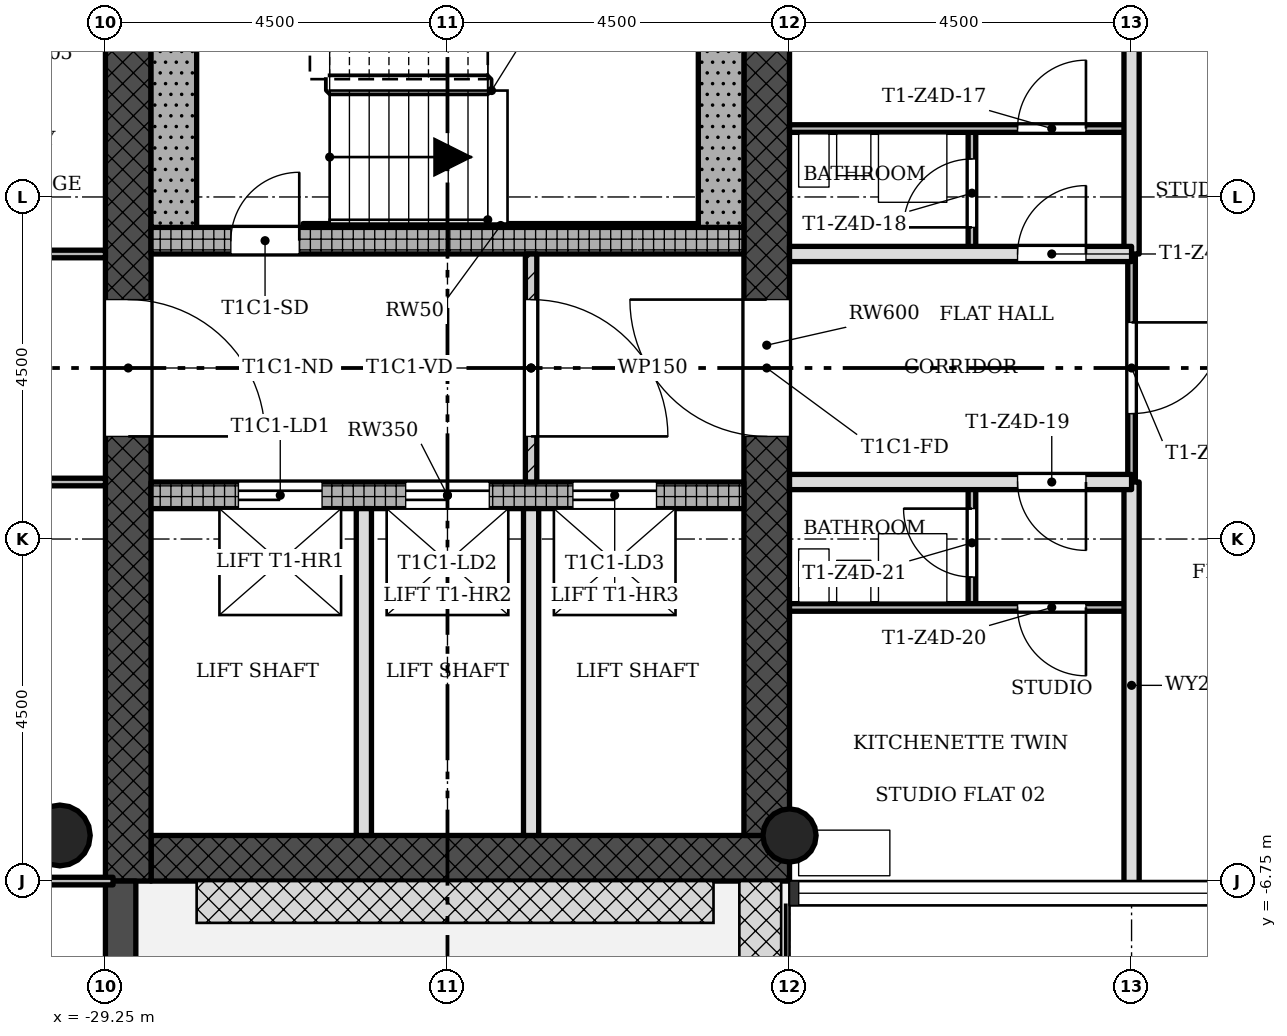
"""IFC4 building model, lengths in metres.
Left out: names, types, materials, properties, quantities, classifications, styles, units other than length and angle.
Written with IfcOpenShell. Run it as: python <this file> out.ifc"""

import sys

from ifc_helpers import new_model, si_unit, direction, frame, frame_2d, origin, origin_2d, place, context, subcontext, project, spatial, rectangle, hollow_circle, extrude, element, fill, save


model = new_model("IFC4")
c1 = context("Model", 3, precision=1e-05, world=origin(), true_north=direction((0.0, 1.0)))
c2 = subcontext(c1, "Body", "Model", "MODEL_VIEW")
j1 = project(units=[si_unit("LENGTHUNIT", "METRE"), si_unit("PLANEANGLEUNIT", "RADIAN")], contexts=[c1])
p1 = place(None, origin())
s1 = spatial("IfcSite", under=j1, at=p1, CompositionType="ELEMENT")
p2 = place(p1, origin())
s2 = spatial("IfcBuilding", under=s1, at=p2, CompositionType="ELEMENT")
p3 = place(p2, frame((0.0, 0.0, 199.4)))
s3 = spatial("IfcBuildingStorey", under=s2, at=p3, CompositionType="ELEMENT", Elevation=199.4)
p4 = place(p3, frame((-28.65, -6.45, 0.0), z_axis=(0.0, 0.0, 1.0), x_axis=(1.0, 0.0, 0.0)))
e1 = element("IfcWall", 1, at=p4, inside=s3, PredefinedType="SHEAR", context=c2, shape_type="SweptSolid", body=[
    extrude(rectangle(XDim=8.4, YDim=0.6, at=frame_2d((4.2, 0.0))), origin(), (0.0, 0.0, 1.0), 3.4),
])
p5 = place(p3, frame((-20.55, -6.15, 0.0), z_axis=(0.0, 0.0, 1.0), x_axis=(0.0, 1.0, 0.0)))
e2 = element("IfcWall", 2, at=p5, inside=s3, PredefinedType="SHEAR", context=c2, shape_type="SweptSolid", body=[
    extrude(rectangle(XDim=12.9, YDim=0.6, at=frame_2d((6.45, 0.0))), origin(), (0.0, 0.0, 1.0), 3.4),
])
p6 = place(p5, frame((5.25, 0.0, 0.0)))
e3 = element("IfcOpeningElement", 3, at=p6, cuts=e2, PredefinedType="OPENING", context=c2, shape_type="SweptSolid", body=[
    extrude(rectangle(XDim=1.8, YDim=2.1, at=frame_2d((0.9, 1.05))), frame((0.0, 0.31, 0.0), z_axis=(0.0, -1.0, 0.0), x_axis=(1.0, 0.0, 0.0)), (0.0, 0.0, 1.0), 0.62),
])
p7 = place(p3, frame((-28.95, 6.15, 0.0), z_axis=(0.0, 0.0, 1.0), x_axis=(0.0, -1.0, 0.0)))
e4 = element("IfcWall", 4, at=p7, inside=s3, PredefinedType="SHEAR", context=c2, shape_type="SweptSolid", body=[
    extrude(rectangle(XDim=12.9, YDim=0.6, at=frame_2d((6.45, 0.0))), origin(), (0.0, 0.0, 1.0), 3.4),
])
p8 = place(p7, frame((5.25, 0.0, 0.0)))
e5 = element("IfcOpeningElement", 5, at=p8, cuts=e4, PredefinedType="OPENING", context=c2, shape_type="SweptSolid", body=[
    extrude(rectangle(XDim=1.8, YDim=2.1, at=frame_2d((0.9, 1.05))), frame((0.0, 0.31, 0.0), z_axis=(0.0, -1.0, 0.0), x_axis=(1.0, 0.0, 0.0)), (0.0, 0.0, 1.0), 0.62),
])
p9 = place(p3, frame((-28.65, -1.675, 0.0), z_axis=(0.0, 0.0, 1.0), x_axis=(1.0, 0.0, 0.0)))
e6 = element("IfcWall", 6, at=p9, inside=s3, PredefinedType="SHEAR", context=c2, shape_type="SweptSolid", body=[
    extrude(rectangle(XDim=7.8, YDim=0.35, at=frame_2d((3.9, 0.0))), origin(), (0.0, 0.0, 1.0), 3.4),
])
p10 = place(p9, frame((1.15, 0.0, 0.0)))
e7 = element("IfcOpeningElement", 7, at=p10, cuts=e6, PredefinedType="OPENING", context=c2, shape_type="SweptSolid", body=[
    extrude(rectangle(XDim=1.1, YDim=2.1, at=frame_2d((0.55, 1.05))), frame((0.0, 0.185, 0.0), z_axis=(0.0, -1.0, 0.0), x_axis=(1.0, 0.0, 0.0)), (0.0, 0.0, 1.0), 0.37),
])
p11 = place(p9, frame((3.35, 0.0, 0.0)))
e8 = element("IfcOpeningElement", 8, at=p11, cuts=e6, PredefinedType="OPENING", context=c2, shape_type="SweptSolid", body=[
    extrude(rectangle(XDim=1.1, YDim=2.1, at=frame_2d((0.55, 1.05))), frame((0.0, 0.185, 0.0), z_axis=(0.0, -1.0, 0.0), x_axis=(1.0, 0.0, 0.0)), (0.0, 0.0, 1.0), 0.37),
])
p12 = place(p9, frame((5.55, 0.0, 0.0)))
e9 = element("IfcOpeningElement", 9, at=p12, cuts=e6, PredefinedType="OPENING", context=c2, shape_type="SweptSolid", body=[
    extrude(rectangle(XDim=1.1, YDim=2.1, at=frame_2d((0.55, 1.05))), frame((0.0, 0.185, 0.0), z_axis=(0.0, -1.0, 0.0), x_axis=(1.0, 0.0, 0.0)), (0.0, 0.0, 1.0), 0.37),
])
p13 = place(p3, frame((-28.65, 1.675, 0.0), z_axis=(0.0, 0.0, 1.0), x_axis=(1.0, 0.0, 0.0)))
e10 = element("IfcWall", 10, at=p13, inside=s3, PredefinedType="SHEAR", context=c2, shape_type="SweptSolid", body=[
    extrude(rectangle(XDim=7.8, YDim=0.35, at=frame_2d((3.9, 0.0))), origin(), (0.0, 0.0, 1.0), 3.4),
])
p14 = place(p13, frame((1.05, 0.0, 0.0)))
e11 = element("IfcOpeningElement", 11, at=p14, cuts=e10, PredefinedType="OPENING", context=c2, shape_type="SweptSolid", body=[
    extrude(rectangle(XDim=0.9, YDim=2.1, at=frame_2d((0.45, 1.05))), frame((0.0, 0.185, 0.0), z_axis=(0.0, -1.0, 0.0), x_axis=(1.0, 0.0, 0.0)), (0.0, 0.0, 1.0), 0.37),
])
p15 = place(p3, frame((-20.25, -6.15, 0.0), z_axis=(0.0, 0.0, 1.0), x_axis=(1.0, 0.0, 0.0)))
e12 = element("IfcColumn", 12, at=p15, inside=s3, PredefinedType="COLUMN", context=c2, shape_type="SweptSolid", body=[
    extrude(hollow_circle(Radius=0.35, WallThickness=0.025, at=origin_2d()), origin(), (0.0, 0.0, 1.0), 3.4),
])
p16 = place(p3, frame((-29.85, -6.15, 0.0), z_axis=(0.0, 0.0, 1.0), x_axis=(1.0, 0.0, 0.0)))
e13 = element("IfcColumn", 13, at=p16, inside=s3, PredefinedType="COLUMN", context=c2, shape_type="SweptSolid", body=[
    extrude(hollow_circle(Radius=0.4, WallThickness=0.028, at=origin_2d()), origin(), (0.0, 0.0, 1.0), 3.4),
])
p17 = place(p3, frame((-29.05, -11.25, -0.02), z_axis=(0.0, 0.0, 1.0), x_axis=(0.0, 1.0, 0.0)))
e14 = element("IfcWall", 14, at=p17, inside=s3, PredefinedType="STANDARD", context=c2, shape_type="SweptSolid", body=[
    extrude(rectangle(XDim=4.5, YDim=0.4, at=frame_2d((2.25, 0.0))), origin(), (0.0, 0.0, 1.0), 3.12),
])
p18 = place(p17, frame((1.35, 0.0, 0.02)))
e15 = element("IfcOpeningElement", 15, at=p18, cuts=e14, PredefinedType="OPENING", context=c2, shape_type="SweptSolid", body=[
    extrude(rectangle(XDim=1.8, YDim=2.1, at=frame_2d((0.9, 1.05))), frame((0.0, 0.21, 0.0), z_axis=(0.0, -1.0, 0.0), x_axis=(1.0, 0.0, 0.0)), (0.0, 0.0, 1.0), 0.42),
])
p19 = place(p3, frame((-23.65, -1.5, 0.0), z_axis=(0.0, 0.0, 1.0), x_axis=(0.0, 1.0, 0.0)))
e16 = element("IfcWall", 16, at=p19, inside=s3, PredefinedType="PARTITIONING", context=c2, shape_type="SweptSolid", body=[
    extrude(rectangle(XDim=3.0, YDim=0.15, at=frame_2d((1.5, 0.0))), origin(), (0.0, 0.0, 1.0), 3.0),
])
p20 = place(p19, frame((0.6, 0.0, 0.0)))
e17 = element("IfcOpeningElement", 17, at=p20, cuts=e16, PredefinedType="OPENING", context=c2, shape_type="SweptSolid", body=[
    extrude(rectangle(XDim=1.8, YDim=2.1, at=frame_2d((0.9, 1.05))), frame((0.0, 0.085, 0.0), z_axis=(0.0, -1.0, 0.0), x_axis=(1.0, 0.0, 0.0)), (0.0, 0.0, 1.0), 0.17),
])
for number, where, z_axis, x_axis in (
    (18, (-25.85, -6.15, 0.0), (0.0, 0.0, 1.0), (0.0, 1.0, 0.0)),
    (19, (-23.65, -6.15, 0.0), (0.0, 0.0, 1.0), (0.0, 1.0, 0.0)),
):
    element("IfcWall", number, at=place(p3, frame(where, z_axis=z_axis, x_axis=x_axis)), inside=s3, PredefinedType="SOLIDWALL", context=c2, shape_type="SweptSolid", body=[
        extrude(rectangle(XDim=4.3, YDim=0.2, at=frame_2d((2.15, 0.0))), origin(), (0.0, 0.0, 1.0), 3.0),
    ])
p21 = place(p3, frame((-17.85, -3.15, 0.0), z_axis=(0.0, 0.0, 1.0), x_axis=(0.0, 1.0, 0.0)))
e20 = element("IfcWall", 20, at=p21, inside=s3, PredefinedType="PARTITIONING", context=c2, shape_type="SweptSolid", body=[
    extrude(rectangle(XDim=1.65, YDim=0.1, at=frame_2d((0.825, 0.0))), origin(), (0.0, 0.0, 1.0), 3.0),
])
p22 = place(p21, frame((0.4, 0.0, 0.0)))
e21 = element("IfcOpeningElement", 21, at=p22, cuts=e20, PredefinedType="OPENING", context=c2, shape_type="SweptSolid", body=[
    extrude(rectangle(XDim=0.9, YDim=2.1, at=frame_2d((0.45, 1.05))), frame((0.0, 0.06, 0.0), z_axis=(0.0, -1.0, 0.0), x_axis=(1.0, 0.0, 0.0)), (0.0, 0.0, 1.0), 0.12),
])
p23 = place(p3, frame((-17.85, 1.5, 0.0), z_axis=(0.0, 0.0, 1.0), x_axis=(0.0, 1.0, 0.0)))
e22 = element("IfcWall", 22, at=p23, inside=s3, PredefinedType="PARTITIONING", context=c2, shape_type="SweptSolid", body=[
    extrude(rectangle(XDim=1.65, YDim=0.1, at=frame_2d((0.825, 0.0))), origin(), (0.0, 0.0, 1.0), 3.0),
])
p24 = place(p23, frame((0.35, 0.0, 0.0)))
e23 = element("IfcOpeningElement", 23, at=p24, cuts=e22, PredefinedType="OPENING", context=c2, shape_type="SweptSolid", body=[
    extrude(rectangle(XDim=0.9, YDim=2.1, at=frame_2d((0.45, 1.05))), frame((0.0, 0.06, 0.0), z_axis=(0.0, -1.0, 0.0), x_axis=(1.0, 0.0, 0.0)), (0.0, 0.0, 1.0), 0.12),
])
p25 = place(p3, frame((-15.75, -1.5, 0.0), z_axis=(0.0, 0.0, 1.0), x_axis=(0.0, 1.0, 0.0)))
e24 = element("IfcWall", 24, at=p25, inside=s3, PredefinedType="PARTITIONING", context=c2, shape_type="SweptSolid", body=[
    extrude(rectangle(XDim=3.0, YDim=0.1, at=frame_2d((1.5, 0.0))), origin(), (0.0, 0.0, 1.0), 3.0),
])
p26 = place(p25, frame((0.9, 0.0, 0.0)))
e25 = element("IfcOpeningElement", 25, at=p26, cuts=e24, PredefinedType="OPENING", context=c2, shape_type="SweptSolid", body=[
    extrude(rectangle(XDim=1.2, YDim=2.1, at=frame_2d((0.6, 1.05))), frame((0.0, 0.06, 0.0), z_axis=(0.0, -1.0, 0.0), x_axis=(1.0, 0.0, 0.0)), (0.0, 0.0, 1.0), 0.12),
])
for number, where, z_axis, x_axis in (
    (26, (-15.75, -6.85, 0.0), (0.0, 0.0, 1.0), (0.0, 1.0, 0.0)),
    (27, (-15.75, 1.5, 0.0), (0.0, 0.0, 1.0), (0.0, 1.0, 0.0)),
):
    element("IfcWall", number, at=place(p3, frame(where, z_axis=z_axis, x_axis=x_axis)), inside=s3, PredefinedType="SOLIDWALL", context=c2, shape_type="SweptSolid", body=[
        extrude(rectangle(XDim=5.35, YDim=0.2, at=frame_2d((2.675, 0.0))), origin(), (0.0, 0.0, 1.0), 3.0),
    ])
p27 = place(p3, frame((-35.1, -6.75, 0.0), z_axis=(0.0, 0.0, 1.0), x_axis=(1.0, 0.0, 0.0)))
e28 = element("IfcWall", 28, at=p27, inside=s3, PredefinedType="PARTITIONING", context=c2, shape_type="SweptSolid", body=[
    extrude(rectangle(XDim=5.95, YDim=0.1, at=frame_2d((2.975, 0.0))), origin(), (0.0, 0.0, 1.0), 3.0),
])
p28 = place(p3, frame((-20.25, -3.15, 0.0), z_axis=(0.0, 0.0, 1.0), x_axis=(1.0, 0.0, 0.0)))
e29 = element("IfcWall", 29, at=p28, inside=s3, PredefinedType="PARTITIONING", context=c2, shape_type="SweptSolid", body=[
    extrude(rectangle(XDim=4.5, YDim=0.1, at=frame_2d((2.25, 0.0))), origin(), (0.0, 0.0, 1.0), 3.0),
])
p29 = place(p28, frame((3.0, 0.0, 0.0)))
e30 = element("IfcOpeningElement", 30, at=p29, cuts=e29, PredefinedType="OPENING", context=c2, shape_type="SweptSolid", body=[
    extrude(rectangle(XDim=0.9, YDim=2.1, at=frame_2d((0.45, 1.05))), frame((0.0, 0.06, 0.0), z_axis=(0.0, -1.0, 0.0), x_axis=(1.0, 0.0, 0.0)), (0.0, 0.0, 1.0), 0.12),
])
p30 = place(p3, frame((-31.5, -1.5, 0.0), z_axis=(0.0, 0.0, 1.0), x_axis=(1.0, 0.0, 0.0)))
e31 = element("IfcWall", 31, at=p30, inside=s3, PredefinedType="PARTITIONING", context=c2, shape_type="SweptSolid", body=[
    extrude(rectangle(XDim=2.25, YDim=0.1, at=frame_2d((1.125, 0.0))), origin(), (0.0, 0.0, 1.0), 3.0),
])
p31 = place(p3, frame((-20.25, -1.5, 0.0), z_axis=(0.0, 0.0, 1.0), x_axis=(1.0, 0.0, 0.0)))
e32 = element("IfcWall", 32, at=p31, inside=s3, PredefinedType="SOLIDWALL", context=c2, shape_type="SweptSolid", body=[
    extrude(rectangle(XDim=4.5, YDim=0.2, at=frame_2d((2.25, 0.0))), origin(), (0.0, 0.0, 1.0), 3.0),
])
p32 = place(p31, frame((3.0, 0.0, 0.0)))
e33 = element("IfcOpeningElement", 33, at=p32, cuts=e32, PredefinedType="OPENING", context=c2, shape_type="SweptSolid", body=[
    extrude(rectangle(XDim=0.9, YDim=2.1, at=frame_2d((0.45, 1.05))), frame((0.0, 0.11, 0.0), z_axis=(0.0, -1.0, 0.0), x_axis=(1.0, 0.0, 0.0)), (0.0, 0.0, 1.0), 0.22),
])
p33 = place(p3, frame((-31.5, 1.5, 0.0), z_axis=(0.0, 0.0, 1.0), x_axis=(1.0, 0.0, 0.0)))
e34 = element("IfcWall", 34, at=p33, inside=s3, PredefinedType="PARTITIONING", context=c2, shape_type="SweptSolid", body=[
    extrude(rectangle(XDim=2.25, YDim=0.1, at=frame_2d((1.125, 0.0))), origin(), (0.0, 0.0, 1.0), 3.0),
])
p34 = place(p3, frame((-20.25, 1.5, 0.0), z_axis=(0.0, 0.0, 1.0), x_axis=(1.0, 0.0, 0.0)))
e35 = element("IfcWall", 35, at=p34, inside=s3, PredefinedType="SOLIDWALL", context=c2, shape_type="SweptSolid", body=[
    extrude(rectangle(XDim=4.5, YDim=0.2, at=frame_2d((2.25, 0.0))), origin(), (0.0, 0.0, 1.0), 3.0),
])
p35 = place(p34, frame((3.0, 0.0, 0.0)))
e36 = element("IfcOpeningElement", 36, at=p35, cuts=e35, PredefinedType="OPENING", context=c2, shape_type="SweptSolid", body=[
    extrude(rectangle(XDim=0.9, YDim=2.1, at=frame_2d((0.45, 1.05))), frame((0.0, 0.11, 0.0), z_axis=(0.0, -1.0, 0.0), x_axis=(1.0, 0.0, 0.0)), (0.0, 0.0, 1.0), 0.22),
])
p36 = place(p3, frame((-20.25, 3.15, 0.0), z_axis=(0.0, 0.0, 1.0), x_axis=(1.0, 0.0, 0.0)))
e37 = element("IfcWall", 37, at=p36, inside=s3, PredefinedType="PARTITIONING", context=c2, shape_type="SweptSolid", body=[
    extrude(rectangle(XDim=4.5, YDim=0.1, at=frame_2d((2.25, 0.0))), origin(), (0.0, 0.0, 1.0), 3.0),
])
p37 = place(p36, frame((3.0, 0.0, 0.0)))
e38 = element("IfcOpeningElement", 38, at=p37, cuts=e37, PredefinedType="OPENING", context=c2, shape_type="SweptSolid", body=[
    extrude(rectangle(XDim=0.9, YDim=2.1, at=frame_2d((0.45, 1.05))), frame((0.0, 0.06, 0.0), z_axis=(0.0, -1.0, 0.0), x_axis=(1.0, 0.0, 0.0)), (0.0, 0.0, 1.0), 0.12),
])
for number, where, z_axis, x_axis in (
    (39, (-21.15, 1.85, 0.0), (0.0, 0.0, 1.0), (0.0, 1.0, 0.0)),
    (40, (-28.35, 1.85, 0.0), (0.0, 0.0, 1.0), (0.0, 1.0, 0.0)),
):
    element("IfcWall", number, at=place(p3, frame(where, z_axis=z_axis, x_axis=x_axis)), inside=s3, PredefinedType="SHEAR", context=c2, shape_type="SweptSolid", body=[
        extrude(rectangle(XDim=4.3, YDim=0.6, at=frame_2d((2.15, 0.0))), origin(), (0.0, 0.0, 1.0), 3.4),
    ])
p38 = place(p3, frame((-26.65, 1.875, 0.0), z_axis=(0.0, 0.0, 1.0), x_axis=(1.0, 0.0, 0.0)))
e41 = element("IfcWall", 41, at=p38, inside=s3, PredefinedType="SHEAR", context=c2, shape_type="SweptSolid", body=[
    extrude(rectangle(XDim=5.2, YDim=0.05, at=frame_2d((2.6, 0.0))), origin(), (0.0, 0.0, 1.0), 3.4),
])
p39 = place(p20, origin())
e42 = element("IfcDoor", 42, at=p39, inside=s3, OperationType="SINGLE_SWING_LEFT", PredefinedType="DOOR", context=c2, shape_type="SweptSolid", body=[
    extrude(rectangle(XDim=1.8, YDim=2.1, at=frame_2d((0.9, 1.05))), frame((0.0, 0.025, 0.0), z_axis=(0.0, -1.0, 0.0), x_axis=(1.0, 0.0, 0.0)), (0.0, 0.0, 1.0), 0.05),
])
fill(e17, e42)
p40 = place(p35, origin())
e43 = element("IfcDoor", 43, at=p40, inside=s3, OperationType="SINGLE_SWING_LEFT", PredefinedType="DOOR", context=c2, shape_type="SweptSolid", body=[
    extrude(rectangle(XDim=0.9, YDim=2.1, at=frame_2d((0.45, 1.05))), frame((0.0, 0.025, 0.0), z_axis=(0.0, -1.0, 0.0), x_axis=(1.0, 0.0, 0.0)), (0.0, 0.0, 1.0), 0.05),
])
fill(e36, e43)
p41 = place(p37, origin())
e44 = element("IfcDoor", 44, at=p41, inside=s3, OperationType="SINGLE_SWING_LEFT", PredefinedType="DOOR", context=c2, shape_type="SweptSolid", body=[
    extrude(rectangle(XDim=0.9, YDim=2.1, at=frame_2d((0.45, 1.05))), frame((0.0, 0.025, 0.0), z_axis=(0.0, -1.0, 0.0), x_axis=(1.0, 0.0, 0.0)), (0.0, 0.0, 1.0), 0.05),
])
fill(e38, e44)
p42 = place(p24, origin())
e45 = element("IfcDoor", 45, at=p42, inside=s3, OperationType="SINGLE_SWING_RIGHT", PredefinedType="DOOR", context=c2, shape_type="SweptSolid", body=[
    extrude(rectangle(XDim=0.9, YDim=2.1, at=frame_2d((0.45, 1.05))), frame((0.0, 0.025, 0.0), z_axis=(0.0, -1.0, 0.0), x_axis=(1.0, 0.0, 0.0)), (0.0, 0.0, 1.0), 0.05),
])
fill(e23, e45)
p43 = place(p32, origin())
e46 = element("IfcDoor", 46, at=p43, inside=s3, OperationType="SINGLE_SWING_RIGHT", PredefinedType="DOOR", context=c2, shape_type="SweptSolid", body=[
    extrude(rectangle(XDim=0.9, YDim=2.1, at=frame_2d((0.45, 1.05))), frame((0.0, 0.025, 0.0), z_axis=(0.0, -1.0, 0.0), x_axis=(1.0, 0.0, 0.0)), (0.0, 0.0, 1.0), 0.05),
])
fill(e33, e46)
p44 = place(p29, origin())
e47 = element("IfcDoor", 47, at=p44, inside=s3, OperationType="SINGLE_SWING_RIGHT", PredefinedType="DOOR", context=c2, shape_type="SweptSolid", body=[
    extrude(rectangle(XDim=0.9, YDim=2.1, at=frame_2d((0.45, 1.05))), frame((0.0, 0.025, 0.0), z_axis=(0.0, -1.0, 0.0), x_axis=(1.0, 0.0, 0.0)), (0.0, 0.0, 1.0), 0.05),
])
fill(e30, e47)
p45 = place(p22, origin())
e48 = element("IfcDoor", 48, at=p45, inside=s3, OperationType="SINGLE_SWING_LEFT", PredefinedType="DOOR", context=c2, shape_type="SweptSolid", body=[
    extrude(rectangle(XDim=0.9, YDim=2.1, at=frame_2d((0.45, 1.05))), frame((0.0, 0.025, 0.0), z_axis=(0.0, -1.0, 0.0), x_axis=(1.0, 0.0, 0.0)), (0.0, 0.0, 1.0), 0.05),
])
fill(e21, e48)
p46 = place(p26, origin())
e49 = element("IfcDoor", 49, at=p46, inside=s3, OperationType="SINGLE_SWING_RIGHT", PredefinedType="DOOR", context=c2, shape_type="SweptSolid", body=[
    extrude(rectangle(XDim=1.2, YDim=2.1, at=frame_2d((0.6, 1.05))), frame((0.0, 0.025, 0.0), z_axis=(0.0, -1.0, 0.0), x_axis=(1.0, 0.0, 0.0)), (0.0, 0.0, 1.0), 0.05),
])
fill(e25, e49)
p47 = place(p14, origin())
e50 = element("IfcDoor", 50, at=p47, inside=s3, OperationType="SINGLE_SWING_LEFT", PredefinedType="DOOR", context=c2, shape_type="SweptSolid", body=[
    extrude(rectangle(XDim=0.9, YDim=2.1, at=frame_2d((0.45, 1.05))), frame((0.0, 0.025, 0.0), z_axis=(0.0, -1.0, 0.0), x_axis=(1.0, 0.0, 0.0)), (0.0, 0.0, 1.0), 0.05),
])
fill(e11, e50)
p48 = place(p10, origin())
e51 = element("IfcDoor", 51, at=p48, inside=s3, OperationType="SLIDING_TO_LEFT", PredefinedType="DOOR", context=c2, shape_type="SweptSolid", body=[
    extrude(rectangle(XDim=1.1, YDim=2.1, at=frame_2d((0.55, 1.05))), frame((0.0, 0.025, 0.0), z_axis=(0.0, -1.0, 0.0), x_axis=(1.0, 0.0, 0.0)), (0.0, 0.0, 1.0), 0.05),
])
fill(e7, e51)
p49 = place(p11, origin())
e52 = element("IfcDoor", 52, at=p49, inside=s3, OperationType="SLIDING_TO_LEFT", PredefinedType="DOOR", context=c2, shape_type="SweptSolid", body=[
    extrude(rectangle(XDim=1.1, YDim=2.1, at=frame_2d((0.55, 1.05))), frame((0.0, 0.025, 0.0), z_axis=(0.0, -1.0, 0.0), x_axis=(1.0, 0.0, 0.0)), (0.0, 0.0, 1.0), 0.05),
])
fill(e8, e52)
p50 = place(p12, origin())
e53 = element("IfcDoor", 53, at=p50, inside=s3, OperationType="SLIDING_TO_LEFT", PredefinedType="DOOR", context=c2, shape_type="SweptSolid", body=[
    extrude(rectangle(XDim=1.1, YDim=2.1, at=frame_2d((0.55, 1.05))), frame((0.0, 0.025, 0.0), z_axis=(0.0, -1.0, 0.0), x_axis=(1.0, 0.0, 0.0)), (0.0, 0.0, 1.0), 0.05),
])
fill(e9, e53)
p51 = place(p8, origin())
e54 = element("IfcDoor", 54, at=p51, inside=s3, OperationType="SINGLE_SWING_LEFT", PredefinedType="DOOR", context=c2, shape_type="SweptSolid", body=[
    extrude(rectangle(XDim=1.8, YDim=2.1, at=frame_2d((0.9, 1.05))), frame((0.0, 0.025, 0.0), z_axis=(0.0, -1.0, 0.0), x_axis=(1.0, 0.0, 0.0)), (0.0, 0.0, 1.0), 0.05),
])
fill(e5, e54)
p52 = place(p6, origin())
e55 = element("IfcDoor", 55, at=p52, inside=s3, OperationType="SINGLE_SWING_LEFT", PredefinedType="DOOR", context=c2, shape_type="SweptSolid", body=[
    extrude(rectangle(XDim=1.8, YDim=2.1, at=frame_2d((0.9, 1.05))), frame((0.0, 0.025, 0.0), z_axis=(0.0, -1.0, 0.0), x_axis=(1.0, 0.0, 0.0)), (0.0, 0.0, 1.0), 0.05),
])
fill(e3, e55)
save(model, sys.argv[1])
